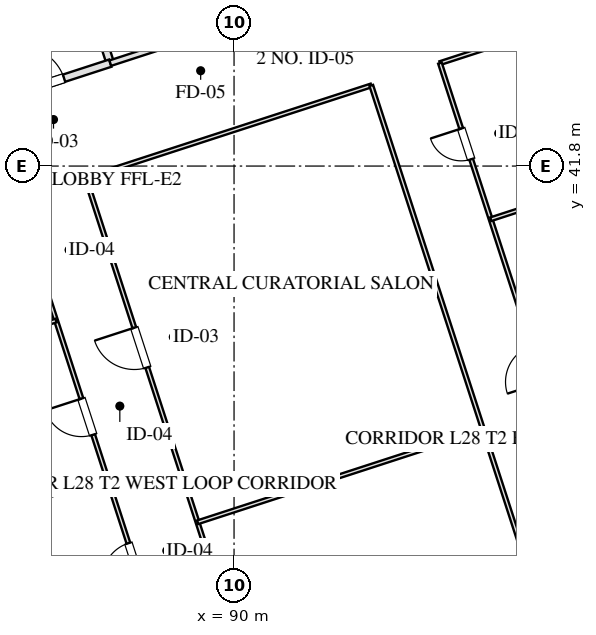
"""IFC4 building model, lengths in metres.
Left out: names, types, materials, properties, quantities, classifications, styles, units other than length and angle.
Written with IfcOpenShell. Run it as: python <this file> out.ifc"""

import sys

from ifc_helpers import new_model, si_unit, direction, frame, frame_2d, origin, place, context, subcontext, project, spatial, rectangle, extrude, element, fill, save


model = new_model("IFC4")
c1 = context("Model", 3, precision=1e-05, world=origin(), true_north=direction((0.0, 1.0)))
c2 = subcontext(c1, "Body", "Model", "MODEL_VIEW")
j1 = project(units=[si_unit("LENGTHUNIT", "METRE"), si_unit("PLANEANGLEUNIT", "RADIAN")], contexts=[c1])
p1 = place(None, origin())
s1 = spatial("IfcSite", under=j1, at=p1, CompositionType="ELEMENT")
p2 = place(p1, origin())
s2 = spatial("IfcBuilding", under=s1, at=p2, CompositionType="ELEMENT")
p3 = place(p2, frame((0.0, 0.0, 110.4)))
s3 = spatial("IfcBuildingStorey", under=s2, at=p3, CompositionType="ELEMENT", Elevation=110.4)
p4 = place(p3, frame((86.743, 44.508, 0.0), z_axis=(0.0, 0.0, 1.0), x_axis=(-0.309016001439, 0.951056838919, 0.0)))
e1 = element("IfcWall", 1, at=p4, inside=s3, PredefinedType="PARTITIONING", context=c2, shape_type="SweptSolid", body=[
    extrude(rectangle(XDim=8.43, YDim=0.2, at=frame_2d((4.215, 0.0))), origin(), (0.0, 0.0, 1.0), 3.175),
])
p5 = place(p3, frame((83.101, 43.324, 0.0), z_axis=(0.0, 0.0, 1.0), x_axis=(0.951052804469, 0.309028417967, 0.0)))
e2 = element("IfcWall", 2, at=p5, inside=s3, PredefinedType="PARTITIONING", context=c2, shape_type="SweptSolid", body=[
    extrude(rectangle(XDim=3.83, YDim=0.2, at=frame_2d((1.915, 0.0))), origin(), (0.0, 0.0, 1.0), 3.175),
])
p6 = place(p5, frame((1.35, 0.0, 0.0)))
e3 = element("IfcOpeningElement", 3, at=p6, cuts=e2, PredefinedType="OPENING", context=c2, shape_type="SweptSolid", body=[
    extrude(rectangle(XDim=1.2, YDim=2.05, at=frame_2d((0.6, 1.025))), frame((0.0, 0.11, 0.0), z_axis=(0.0, -1.0, 0.0), x_axis=(1.0, 0.0, 0.0)), (0.0, 0.0, 1.0), 0.22),
])
p7 = place(p3, frame((86.743, 44.508, 0.0), z_axis=(0.0, 0.0, 1.0), x_axis=(0.951063829732, 0.308994485023, 0.0)))
e4 = element("IfcWall", 4, at=p7, inside=s3, PredefinedType="PARTITIONING", context=c2, shape_type="SweptSolid", body=[
    extrude(rectangle(XDim=4.4, YDim=0.15, at=frame_2d((2.2, 0.0))), origin(), (0.0, 0.0, 1.0), 3.175),
])
p8 = place(p7, frame((1.45, 0.0, 0.0)))
e5 = element("IfcOpeningElement", 5, at=p8, cuts=e4, PredefinedType="OPENING", context=c2, shape_type="SweptSolid", body=[
    extrude(rectangle(XDim=1.5, YDim=2.05, at=frame_2d((0.75, 1.025))), frame((0.0, 0.085, 0.0), z_axis=(0.0, -1.0, 0.0), x_axis=(1.0, 0.0, 0.0)), (0.0, 0.0, 1.0), 0.17),
])
p9 = place(p3, frame((86.097, 41.48, 0.0), z_axis=(0.0, 0.0, 1.0), x_axis=(0.951060182336, 0.309005711233, 0.0)))
e6 = element("IfcWall", 6, at=p9, inside=s3, PredefinedType="MOVABLE", context=c2, shape_type="SweptSolid", body=[
    extrude(rectangle(XDim=7.9, YDim=0.1, at=frame_2d((3.95, 0.0))), origin(), (0.0, 0.0, 1.0), 3.175),
])
p10 = place(p3, frame((95.418, 44.509, 0.0), z_axis=(0.0, 0.0, 1.0), x_axis=(0.951055307445, 0.309020714809, 0.0)))
e7 = element("IfcWall", 7, at=p10, inside=s3, PredefinedType="MOVABLE", context=c2, shape_type="SweptSolid", body=[
    extrude(rectangle(XDim=8.7, YDim=0.1, at=frame_2d((4.35, 0.0))), origin(), (0.0, 0.0, 1.0), 3.175),
])
p11 = place(p3, frame((89.433, 25.067, 0.0), z_axis=(0.0, 0.0, 1.0), x_axis=(-0.30901773025, 0.951056277195, 0.0)))
e8 = element("IfcWall", 8, at=p11, inside=s3, PredefinedType="MOVABLE", context=c2, shape_type="SweptSolid", body=[
    extrude(rectangle(XDim=16.64, YDim=0.1, at=frame_2d((8.32, 0.0))), origin(), (0.0, 0.0, 1.0), 3.175),
])
p12 = place(p11, frame((1.16, 0.0, 0.0)))
e9 = element("IfcOpeningElement", 9, at=p12, cuts=e8, PredefinedType="OPENING", context=c2, shape_type="SweptSolid", body=[
    extrude(rectangle(XDim=1.0, YDim=2.05, at=frame_2d((0.5, 1.025))), frame((0.0, 0.06, 0.0), z_axis=(0.0, -1.0, 0.0), x_axis=(1.0, 0.0, 0.0)), (0.0, 0.0, 1.0), 0.12),
])
p13 = place(p11, frame((6.16, 0.0, 0.0)))
e10 = element("IfcOpeningElement", 10, at=p13, cuts=e8, PredefinedType="OPENING", context=c2, shape_type="SweptSolid", body=[
    extrude(rectangle(XDim=1.0, YDim=2.05, at=frame_2d((0.5, 1.025))), frame((0.0, 0.06, 0.0), z_axis=(0.0, -1.0, 0.0), x_axis=(1.0, 0.0, 0.0)), (0.0, 0.0, 1.0), 0.12),
])
p14 = place(p11, frame((10.16, 0.0, 0.0)))
e11 = element("IfcOpeningElement", 11, at=p14, cuts=e8, PredefinedType="OPENING", context=c2, shape_type="SweptSolid", body=[
    extrude(rectangle(XDim=1.0, YDim=2.05, at=frame_2d((0.5, 1.025))), frame((0.0, 0.06, 0.0), z_axis=(0.0, -1.0, 0.0), x_axis=(1.0, 0.0, 0.0)), (0.0, 0.0, 1.0), 0.12),
])
p15 = place(p11, frame((14.48, 0.0, 0.0)))
e12 = element("IfcOpeningElement", 12, at=p15, cuts=e8, PredefinedType="OPENING", context=c2, shape_type="SweptSolid", body=[
    extrude(rectangle(XDim=1.0, YDim=2.05, at=frame_2d((0.5, 1.025))), frame((0.0, 0.06, 0.0), z_axis=(0.0, -1.0, 0.0), x_axis=(1.0, 0.0, 0.0)), (0.0, 0.0, 1.0), 0.12),
])
p16 = place(p3, frame((91.24, 25.655, 0.0), z_axis=(0.0, 0.0, 1.0), x_axis=(-0.30901773025, 0.951056277195, 0.0)))
e13 = element("IfcWall", 13, at=p16, inside=s3, PredefinedType="MOVABLE", context=c2, shape_type="SweptSolid", body=[
    extrude(rectangle(XDim=16.64, YDim=0.1, at=frame_2d((8.32, 0.0))), origin(), (0.0, 0.0, 1.0), 3.175),
])
p17 = place(p16, frame((3.204, 0.0, 0.0)))
e14 = element("IfcOpeningElement", 14, at=p17, cuts=e13, PredefinedType="OPENING", context=c2, shape_type="SweptSolid", body=[
    extrude(rectangle(XDim=1.1, YDim=2.05, at=frame_2d((0.55, 1.025))), frame((0.0, 0.06, 0.0), z_axis=(0.0, -1.0, 0.0), x_axis=(1.0, 0.0, 0.0)), (0.0, 0.0, 1.0), 0.12),
])
p18 = place(p16, frame((11.404, 0.0, 0.0)))
e15 = element("IfcOpeningElement", 15, at=p18, cuts=e13, PredefinedType="OPENING", context=c2, shape_type="SweptSolid", body=[
    extrude(rectangle(XDim=1.1, YDim=2.05, at=frame_2d((0.55, 1.025))), frame((0.0, 0.06, 0.0), z_axis=(0.0, -1.0, 0.0), x_axis=(1.0, 0.0, 0.0)), (0.0, 0.0, 1.0), 0.12),
])
p19 = place(p3, frame((98.753, 28.096, 0.0), z_axis=(0.0, 0.0, 1.0), x_axis=(-0.30901773025, 0.951056277195, 0.0)))
e16 = element("IfcWall", 16, at=p19, inside=s3, PredefinedType="MOVABLE", context=c2, shape_type="SweptSolid", body=[
    extrude(rectangle(XDim=16.64, YDim=0.1, at=frame_2d((8.32, 0.0))), origin(), (0.0, 0.0, 1.0), 3.175),
])
p20 = place(p3, frame((100.56, 28.683, 0.0), z_axis=(0.0, 0.0, 1.0), x_axis=(-0.309004459387, 0.951060589068, 0.0)))
e17 = element("IfcWall", 17, at=p20, inside=s3, PredefinedType="MOVABLE", context=c2, shape_type="SweptSolid", body=[
    extrude(rectangle(XDim=16.64, YDim=0.1, at=frame_2d((8.32, 0.0))), origin(), (0.0, 0.0, 1.0), 3.175),
])
p21 = place(p20, frame((1.66, 0.0, 0.0)))
e18 = element("IfcOpeningElement", 18, at=p21, cuts=e17, PredefinedType="OPENING", context=c2, shape_type="SweptSolid", body=[
    extrude(rectangle(XDim=1.05, YDim=2.05, at=frame_2d((0.525, 1.025))), frame((0.0, 0.06, 0.0), z_axis=(0.0, -1.0, 0.0), x_axis=(1.0, 0.0, 0.0)), (0.0, 0.0, 1.0), 0.12),
])
p22 = place(p20, frame((7.82, 0.0, 0.0)))
e19 = element("IfcOpeningElement", 19, at=p22, cuts=e17, PredefinedType="OPENING", context=c2, shape_type="SweptSolid", body=[
    extrude(rectangle(XDim=1.0, YDim=2.05, at=frame_2d((0.5, 1.025))), frame((0.0, 0.06, 0.0), z_axis=(0.0, -1.0, 0.0), x_axis=(1.0, 0.0, 0.0)), (0.0, 0.0, 1.0), 0.12),
])
p23 = place(p20, frame((13.98, 0.0, 0.0)))
e20 = element("IfcOpeningElement", 20, at=p23, cuts=e17, PredefinedType="OPENING", context=c2, shape_type="SweptSolid", body=[
    extrude(rectangle(XDim=0.85, YDim=2.05, at=frame_2d((0.425, 1.025))), frame((0.0, 0.06, 0.0), z_axis=(0.0, -1.0, 0.0), x_axis=(1.0, 0.0, 0.0)), (0.0, 0.0, 1.0), 0.12),
])
p24 = place(p3, frame((89.039, 32.426, 0.0), z_axis=(0.0, 0.0, 1.0), x_axis=(0.951051099951, 0.309033663672, 0.0)))
e21 = element("IfcWall", 21, at=p24, inside=s3, PredefinedType="MOVABLE", context=c2, shape_type="SweptSolid", body=[
    extrude(rectangle(XDim=7.9, YDim=0.1, at=frame_2d((3.95, 0.0))), origin(), (0.0, 0.0, 1.0), 3.175),
])
for number, where, z_axis, x_axis in (
    (22, (73.527, 29.363, 0.0), (0.0, 0.0, 1.0), (0.951, 0.309, 0.0)),
    (23, (72.192, 33.471, 0.0), (0.0, 0.0, 1.0), (0.951, 0.309, 0.0)),
):
    element("IfcWall", number, at=place(p3, frame(where, z_axis=z_axis, x_axis=x_axis)), inside=s3, PredefinedType="MOVABLE", context=c2, shape_type="SweptSolid", body=[
        extrude(rectangle(XDim=13.8, YDim=0.1, at=frame_2d((6.9, 0.0))), origin(), (0.0, 0.0, 1.0), 3.175),
    ])
p25 = place(p3, frame((96.753, 40.4, 0.0), z_axis=(0.0, 0.0, 1.0), x_axis=(0.951057987102, 0.309012467661, 0.0)))
e24 = element("IfcWall", 24, at=p25, inside=s3, PredefinedType="MOVABLE", context=c2, shape_type="SweptSolid", body=[
    extrude(rectangle(XDim=8.7, YDim=0.1, at=frame_2d((4.35, 0.0))), origin(), (0.0, 0.0, 1.0), 3.175),
])
p26 = place(p6, origin())
e25 = element("IfcDoor", 25, at=p26, inside=s3, OperationType="SINGLE_SWING_LEFT", PredefinedType="DOOR", context=c2, shape_type="SweptSolid", body=[
    extrude(rectangle(XDim=1.2, YDim=2.05, at=frame_2d((0.6, 1.025))), frame((0.0, 0.025, 0.0), z_axis=(0.0, -1.0, 0.0), x_axis=(1.0, 0.0, 0.0)), (0.0, 0.0, 1.0), 0.05),
])
fill(e3, e25)
p27 = place(p13, origin())
e26 = element("IfcDoor", 26, at=p27, inside=s3, OperationType="SINGLE_SWING_LEFT", PredefinedType="DOOR", context=c2, shape_type="SweptSolid", body=[
    extrude(rectangle(XDim=1.0, YDim=2.05, at=frame_2d((0.5, 1.025))), frame((0.0, 0.025, 0.0), z_axis=(0.0, -1.0, 0.0), x_axis=(1.0, 0.0, 0.0)), (0.0, 0.0, 1.0), 0.05),
])
fill(e10, e26)
p28 = place(p14, origin())
e27 = element("IfcDoor", 27, at=p28, inside=s3, OperationType="SINGLE_SWING_RIGHT", PredefinedType="DOOR", context=c2, shape_type="SweptSolid", body=[
    extrude(rectangle(XDim=1.0, YDim=2.05, at=frame_2d((0.5, 1.025))), frame((0.0, 0.025, 0.0), z_axis=(0.0, -1.0, 0.0), x_axis=(1.0, 0.0, 0.0)), (0.0, 0.0, 1.0), 0.05),
])
fill(e11, e27)
p29 = place(p18, origin())
e28 = element("IfcDoor", 28, at=p29, inside=s3, OperationType="SINGLE_SWING_RIGHT", PredefinedType="DOOR", context=c2, shape_type="SweptSolid", body=[
    extrude(rectangle(XDim=1.1, YDim=2.05, at=frame_2d((0.55, 1.025))), frame((0.0, 0.025, 0.0), z_axis=(0.0, -1.0, 0.0), x_axis=(1.0, 0.0, 0.0)), (0.0, 0.0, 1.0), 0.05),
])
fill(e15, e28)
p30 = place(p23, origin())
e29 = element("IfcDoor", 29, at=p30, inside=s3, OperationType="SINGLE_SWING_RIGHT", PredefinedType="DOOR", context=c2, shape_type="SweptSolid", body=[
    extrude(rectangle(XDim=0.85, YDim=2.05, at=frame_2d((0.425, 1.025))), frame((0.0, 0.025, 0.0), z_axis=(0.0, -1.0, 0.0), x_axis=(1.0, 0.0, 0.0)), (0.0, 0.0, 1.0), 0.05),
])
fill(e20, e29)
save(model, sys.argv[1])
